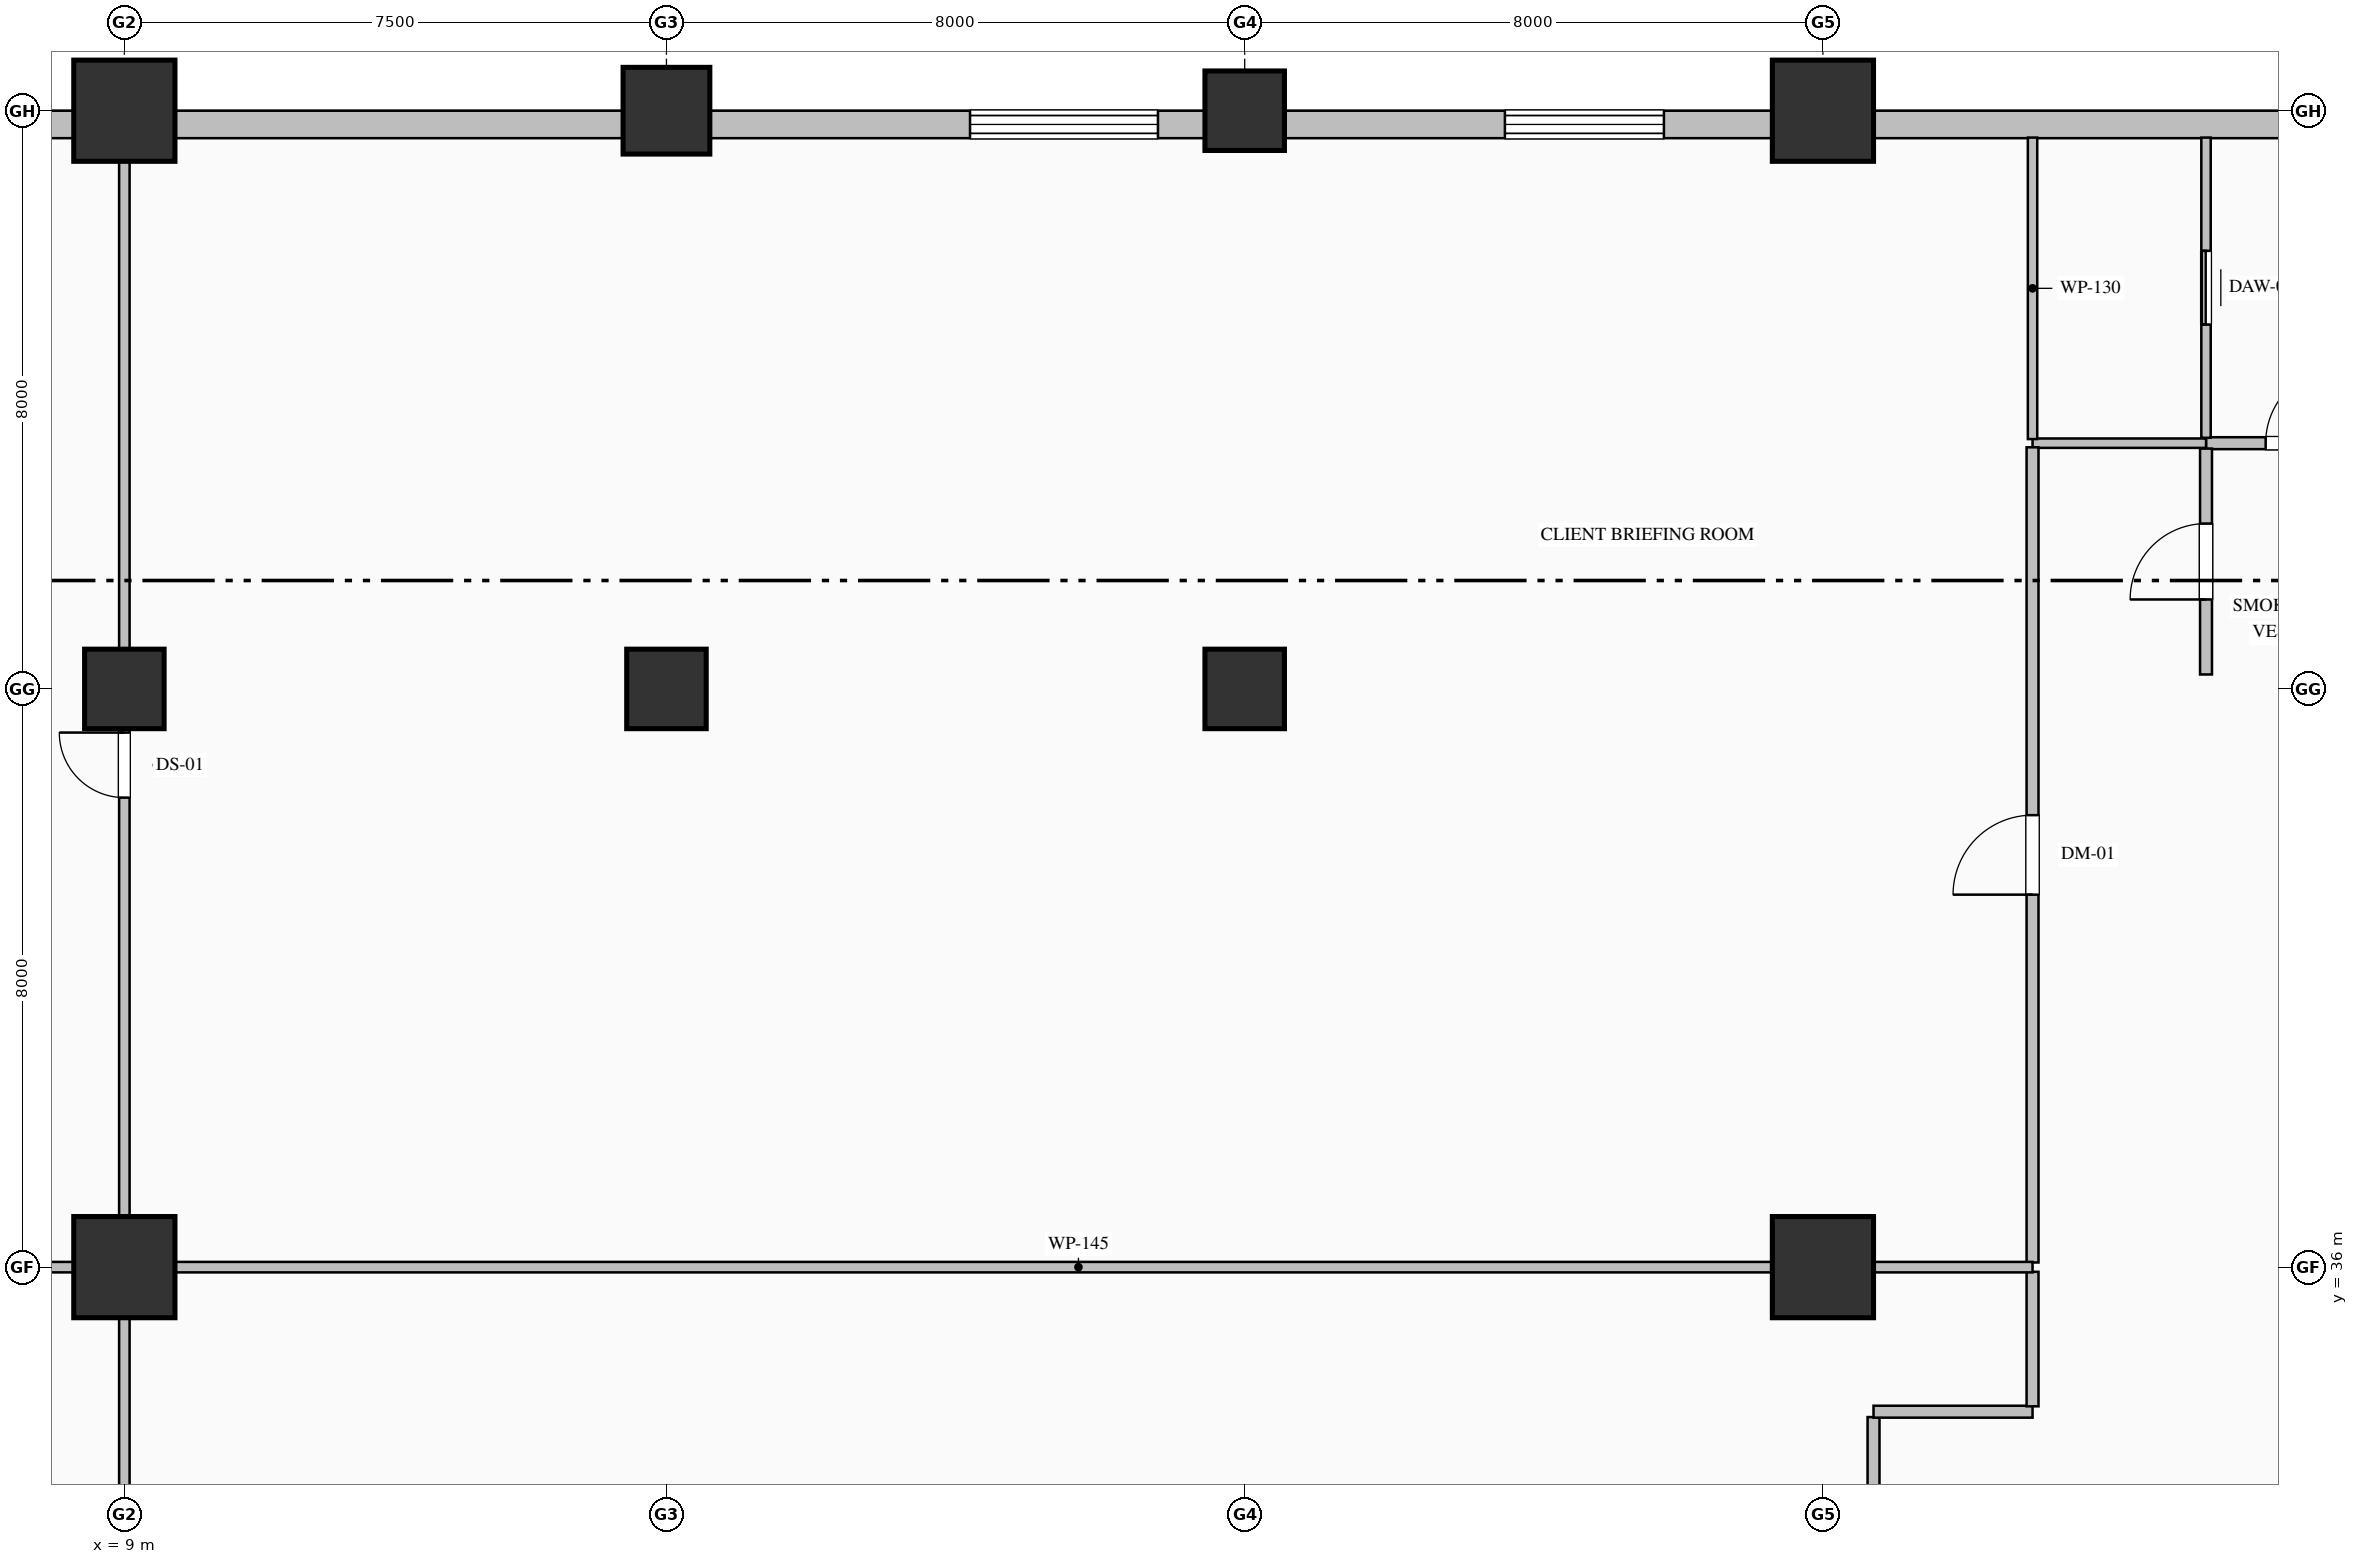
"""IFC4 building model, lengths in metres.
Left out: names, types, materials, properties, quantities, classifications, styles, units other than length and angle.
Written with IfcOpenShell. Run it as: python <this file> out.ifc"""

import sys

from ifc_helpers import new_model, si_unit, direction, frame, frame_2d, origin, origin_2d, place, context, subcontext, project, spatial, rectangle, hollow_rectangle, hollow_circle, extrude, element, fill, save


model = new_model("IFC4")
c1 = context("Model", 3, precision=1e-05, world=origin(), true_north=direction((0.0, 1.0)))
c2 = subcontext(c1, "Body", "Model", "MODEL_VIEW")
j1 = project(units=[si_unit("LENGTHUNIT", "METRE"), si_unit("PLANEANGLEUNIT", "RADIAN")], contexts=[c1])
p1 = place(None, origin())
s1 = spatial("IfcSite", under=j1, at=p1, CompositionType="ELEMENT")
p2 = place(p1, origin())
s2 = spatial("IfcBuilding", under=s1, at=p2, CompositionType="ELEMENT")
p3 = place(p2, frame((0.0, 0.0, 6.0)))
s3 = spatial("IfcBuildingStorey", under=s2, at=p3, CompositionType="ELEMENT", Elevation=6.0)
p4 = place(p3, frame((9.0, 36.0, 0.0), z_axis=(0.0, 0.0, 1.0), x_axis=(1.0, 0.0, 0.0)))
e1 = element("IfcColumn", 1, at=p4, inside=s3, PredefinedType="COLUMN", context=c2, shape_type="SweptSolid", body=[
    extrude(hollow_rectangle(XDim=1.4, YDim=1.4, WallThickness=0.05, at=origin_2d()), origin(), (0.0, 0.0, 1.0), 5.4),
])
p5 = place(p3, frame((9.0, 44.0, 0.0), z_axis=(0.0, 0.0, 1.0), x_axis=(1.0, 0.0, 0.0)))
e2 = element("IfcColumn", 2, at=p5, inside=s3, PredefinedType="COLUMN", context=c2, shape_type="SweptSolid", body=[
    extrude(rectangle(XDim=1.1, YDim=1.1, at=origin_2d()), origin(), (0.0, 0.0, 1.0), 5.4),
])
p6 = place(p3, frame((9.0, 52.0, 0.0), z_axis=(0.0, 0.0, 1.0), x_axis=(1.0, 0.0, 0.0)))
e3 = element("IfcColumn", 3, at=p6, inside=s3, PredefinedType="COLUMN", context=c2, shape_type="SweptSolid", body=[
    extrude(hollow_rectangle(XDim=1.4, YDim=1.4, WallThickness=0.05, at=origin_2d()), origin(), (0.0, 0.0, 1.0), 5.4),
])
p7 = place(p3, frame((16.5, 44.0, 0.0), z_axis=(0.0, 0.0, 1.0), x_axis=(1.0, 0.0, 0.0)))
e4 = element("IfcColumn", 4, at=p7, inside=s3, PredefinedType="COLUMN", context=c2, shape_type="SweptSolid", body=[
    extrude(rectangle(XDim=1.1, YDim=1.1, at=origin_2d()), origin(), (0.0, 0.0, 1.0), 5.4),
])
p8 = place(p3, frame((16.5, 52.0, 0.0), z_axis=(0.0, 0.0, 1.0), x_axis=(1.0, 0.0, 0.0)))
e5 = element("IfcColumn", 5, at=p8, inside=s3, PredefinedType="COLUMN", context=c2, shape_type="SweptSolid", body=[
    extrude(hollow_circle(Radius=0.6, WallThickness=0.04, at=origin_2d()), origin(), (0.0, 0.0, 1.0), 5.4),
])
p9 = place(p3, frame((24.5, 44.0, 0.0), z_axis=(0.0, 0.0, 1.0), x_axis=(1.0, 0.0, 0.0)))
e6 = element("IfcColumn", 6, at=p9, inside=s3, PredefinedType="COLUMN", context=c2, shape_type="SweptSolid", body=[
    extrude(rectangle(XDim=1.1, YDim=1.1, at=origin_2d()), origin(), (0.0, 0.0, 1.0), 5.4),
])
p10 = place(p3, frame((24.5, 52.0, 0.0), z_axis=(0.0, 0.0, 1.0), x_axis=(1.0, 0.0, 0.0)))
e7 = element("IfcColumn", 7, at=p10, inside=s3, PredefinedType="COLUMN", context=c2, shape_type="SweptSolid", body=[
    extrude(hollow_rectangle(XDim=1.1, YDim=1.1, WallThickness=0.04, at=origin_2d()), origin(), (0.0, 0.0, 1.0), 5.4),
])
for number, where, z_axis, x_axis in (
    (8, (32.5, 36.0, 0.0), (0.0, 0.0, 1.0), (1.0, 0.0, 0.0)),
    (9, (32.5, 52.0, 0.0), (0.0, 0.0, 1.0), (1.0, 0.0, 0.0)),
):
    element("IfcColumn", number, at=place(p3, frame(where, z_axis=z_axis, x_axis=x_axis)), inside=s3, PredefinedType="COLUMN", context=c2, shape_type="SweptSolid", body=[
        extrude(hollow_rectangle(XDim=1.4, YDim=1.4, WallThickness=0.05, at=origin_2d()), origin(), (0.0, 0.0, 1.0), 5.4),
    ])
p11 = place(p3, frame((4.0, 51.81, 0.0), z_axis=(0.0, 0.0, 1.0), x_axis=(1.0, 0.0, 0.0)))
e10 = element("IfcWall", 10, at=p11, inside=s3, PredefinedType="SOLIDWALL", context=c2, shape_type="SweptSolid", body=[
    extrude(rectangle(XDim=36.52, YDim=0.38, at=frame_2d((18.26, 0.0))), origin(), (0.0, 0.0, 1.0), 4.62),
])
p12 = place(p11, frame((16.7, 0.0, 0.85)))
e11 = element("IfcOpeningElement", 11, at=p12, cuts=e10, PredefinedType="OPENING", context=c2, shape_type="SweptSolid", body=[
    extrude(rectangle(XDim=2.6, YDim=3.1, at=frame_2d((1.3, 1.55))), frame((0.0, 0.2, 0.0), z_axis=(0.0, -1.0, 0.0), x_axis=(1.0, 0.0, 0.0)), (0.0, 0.0, 1.0), 0.4),
])
p13 = place(p11, frame((24.1, 0.0, 0.9)))
e12 = element("IfcOpeningElement", 12, at=p13, cuts=e10, PredefinedType="OPENING", context=c2, shape_type="SweptSolid", body=[
    extrude(rectangle(XDim=2.2, YDim=2.65, at=frame_2d((1.1, 1.325))), frame((0.0, 0.2, 0.0), z_axis=(0.0, -1.0, 0.0), x_axis=(1.0, 0.0, 0.0)), (0.0, 0.0, 1.0), 0.4),
])
p14 = place(p3, frame((37.8, 47.4, 0.0), z_axis=(0.0, 0.0, 1.0), x_axis=(1.0, 0.0, 0.0)))
e13 = element("IfcWall", 13, at=p14, inside=s3, PredefinedType="PARTITIONING", context=c2, shape_type="SweptSolid", body=[
    extrude(rectangle(XDim=2.7, YDim=0.165, at=frame_2d((1.35, 0.0))), origin(), (0.0, 0.0, 1.0), 5.12),
])
p15 = place(p14, frame((0.825, 0.0, 0.0)))
e14 = element("IfcOpeningElement", 14, at=p15, cuts=e13, PredefinedType="OPENING", context=c2, shape_type="SweptSolid", body=[
    extrude(rectangle(XDim=1.05, YDim=2.15, at=frame_2d((0.525, 1.075))), frame((0.0, 0.093, 0.0), z_axis=(0.0, -1.0, 0.0), x_axis=(1.0, 0.0, 0.0)), (0.0, 0.0, 1.0), 0.185),
])
p16 = place(p3, frame((37.8, 44.2, 0.0), z_axis=(0.0, 0.0, 1.0), x_axis=(0.0, 1.0, 0.0)))
e15 = element("IfcWall", 15, at=p16, inside=s3, PredefinedType="PARTITIONING", context=c2, shape_type="SweptSolid", body=[
    extrude(rectangle(XDim=3.125, YDim=0.165, at=frame_2d((1.563, 0.0))), origin(), (0.0, 0.0, 1.0), 5.12),
])
p17 = place(p16, frame((1.038, 0.0, 0.0)))
e16 = element("IfcOpeningElement", 16, at=p17, cuts=e15, PredefinedType="OPENING", context=c2, shape_type="SweptSolid", body=[
    extrude(rectangle(XDim=1.05, YDim=2.15, at=frame_2d((0.525, 1.075))), frame((0.0, 0.093, 0.0), z_axis=(0.0, -1.0, 0.0), x_axis=(1.0, 0.0, 0.0)), (0.0, 0.0, 1.0), 0.185),
])
p18 = place(p3, frame((37.8, 47.475, 0.0), z_axis=(0.0, 0.0, 1.0), x_axis=(0.0, 1.0, 0.0)))
e17 = element("IfcWall", 17, at=p18, inside=s3, PredefinedType="PARTITIONING", context=c2, shape_type="SweptSolid", body=[
    extrude(rectangle(XDim=4.153, YDim=0.13, at=frame_2d((2.077, 0.0))), origin(), (0.0, 0.0, 1.0), 5.12),
])
p19 = place(p18, frame((1.567, 0.0, 0.0)))
e18 = element("IfcOpeningElement", 18, at=p19, cuts=e17, PredefinedType="OPENING", context=c2, shape_type="SweptSolid", body=[
    extrude(rectangle(XDim=1.02, YDim=2.15, at=frame_2d((0.51, 1.075))), frame((0.0, 0.075, 0.0), z_axis=(0.0, -1.0, 0.0), x_axis=(1.0, 0.0, 0.0)), (0.0, 0.0, 1.0), 0.15),
])
p20 = place(p3, frame((37.8, 47.4, 0.0), z_axis=(0.0, 0.0, 1.0), x_axis=(-1.0, 0.0, 0.0)))
e19 = element("IfcWall", 19, at=p20, inside=s3, PredefinedType="PARTITIONING", context=c2, shape_type="SweptSolid", body=[
    extrude(rectangle(XDim=2.4, YDim=0.13, at=frame_2d((1.2, 0.0))), origin(), (0.0, 0.0, 1.0), 5.12),
])
p21 = place(p3, frame((35.4, 47.457, 0.0), z_axis=(0.0, 0.0, 1.0), x_axis=(0.0, 1.0, 0.0)))
e20 = element("IfcWall", 20, at=p21, inside=s3, PredefinedType="PARTITIONING", context=c2, shape_type="SweptSolid", body=[
    extrude(rectangle(XDim=4.171, YDim=0.13, at=frame_2d((2.085, 0.0))), origin(), (0.0, 0.0, 1.0), 5.12),
])
p22 = place(p3, frame((33.2, 31.875, 0.0), z_axis=(0.0, 0.0, 1.0), x_axis=(0.0, 1.0, 0.0)))
e21 = element("IfcWall", 21, at=p22, inside=s3, PredefinedType="PARTITIONING", context=c2, shape_type="SweptSolid", body=[
    extrude(rectangle(XDim=2.051, YDim=0.165, at=frame_2d((1.025, 0.0))), origin(), (0.0, 0.0, 1.0), 5.12),
])
p23 = place(p3, frame((33.2, 34.0, 0.0), z_axis=(0.0, 0.0, 1.0), x_axis=(1.0, 0.0, 0.0)))
e22 = element("IfcWall", 22, at=p23, inside=s3, PredefinedType="PARTITIONING", context=c2, shape_type="SweptSolid", body=[
    extrude(rectangle(XDim=2.2, YDim=0.165, at=frame_2d((1.1, 0.0))), origin(), (0.0, 0.0, 1.0), 5.12),
])
p24 = place(p3, frame((35.4, 34.074, 0.0), z_axis=(0.0, 0.0, 1.0), x_axis=(0.0, 1.0, 0.0)))
e23 = element("IfcWall", 23, at=p24, inside=s3, PredefinedType="PARTITIONING", context=c2, shape_type="SweptSolid", body=[
    extrude(rectangle(XDim=1.861, YDim=0.165, at=frame_2d((0.931, 0.0))), origin(), (0.0, 0.0, 1.0), 5.12),
])
p25 = place(p3, frame((35.4, 36.064, 0.0), z_axis=(0.0, 0.0, 1.0), x_axis=(0.0, 1.0, 0.0)))
e24 = element("IfcWall", 24, at=p25, inside=s3, PredefinedType="PARTITIONING", context=c2, shape_type="SweptSolid", body=[
    extrude(rectangle(XDim=11.279, YDim=0.165, at=frame_2d((5.639, 0.0))), origin(), (0.0, 0.0, 1.0), 5.12),
])
p26 = place(p25, frame((5.089, 0.0, 0.0)))
e25 = element("IfcOpeningElement", 25, at=p26, cuts=e24, PredefinedType="OPENING", context=c2, shape_type="SweptSolid", body=[
    extrude(rectangle(XDim=1.1, YDim=2.2, at=frame_2d((0.55, 1.1))), frame((0.0, 0.093, 0.0), z_axis=(0.0, -1.0, 0.0), x_axis=(1.0, 0.0, 0.0)), (0.0, 0.0, 1.0), 0.185),
])
p27 = place(p3, frame((9.0, 18.574, 0.0), z_axis=(0.0, 0.0, 1.0), x_axis=(0.0, 1.0, 0.0)))
e26 = element("IfcWall", 26, at=p27, inside=s3, PredefinedType="PARTITIONING", context=c2, shape_type="SweptSolid", body=[
    extrude(rectangle(XDim=17.361, YDim=0.145, at=frame_2d((8.681, 0.0))), origin(), (0.0, 0.0, 1.0), 4.212),
])
p28 = place(p3, frame((9.0, 36.0, 0.0), z_axis=(0.0, 0.0, 1.0), x_axis=(1.0, 0.0, 0.0)))
e27 = element("IfcWall", 27, at=p28, inside=s3, PredefinedType="PARTITIONING", context=c2, shape_type="SweptSolid", body=[
    extrude(rectangle(XDim=26.4, YDim=0.145, at=frame_2d((13.2, 0.0))), origin(), (0.0, 0.0, 1.0), 4.212),
])
p29 = place(p3, frame((0.372, 36.0, 0.0), z_axis=(0.0, 0.0, 1.0), x_axis=(1.0, 0.0, 0.0)))
e28 = element("IfcWall", 28, at=p29, inside=s3, PredefinedType="PARTITIONING", context=c2, shape_type="SweptSolid", body=[
    extrude(rectangle(XDim=8.628, YDim=0.145, at=frame_2d((4.314, 0.0))), origin(), (0.0, 0.0, 1.0), 4.212),
])
p30 = place(p3, frame((9.0, 36.064, 0.0), z_axis=(0.0, 0.0, 1.0), x_axis=(0.0, 1.0, 0.0)))
e29 = element("IfcWall", 29, at=p30, inside=s3, PredefinedType="PARTITIONING", context=c2, shape_type="SweptSolid", body=[
    extrude(rectangle(XDim=15.563, YDim=0.145, at=frame_2d((7.782, 0.0))), origin(), (0.0, 0.0, 1.0), 4.212),
])
p31 = place(p30, frame((6.432, 0.0, 0.0)))
e30 = element("IfcOpeningElement", 30, at=p31, cuts=e29, PredefinedType="OPENING", context=c2, shape_type="SweptSolid", body=[
    extrude(rectangle(XDim=0.9, YDim=2.15, at=frame_2d((0.45, 1.075))), frame((0.0, 0.083, 0.0), z_axis=(0.0, -1.0, 0.0), x_axis=(1.0, 0.0, 0.0)), (0.0, 0.0, 1.0), 0.165),
])
p32 = place(p12, origin())
e31 = element("IfcWindow", 31, at=p32, inside=s3, PartitioningType="TRIPLE_PANEL_VERTICAL", PredefinedType="WINDOW", context=c2, shape_type="SweptSolid", body=[
    extrude(rectangle(XDim=2.6, YDim=3.1, at=frame_2d((1.3, 1.55))), frame((0.0, 0.15, 0.0), z_axis=(0.0, -1.0, 0.0), x_axis=(1.0, 0.0, 0.0)), (0.0, 0.0, 1.0), 0.06),
])
fill(e11, e31)
p33 = place(p13, origin())
e32 = element("IfcWindow", 32, at=p33, inside=s3, PartitioningType="TRIPLE_PANEL_VERTICAL", PredefinedType="WINDOW", context=c2, shape_type="SweptSolid", body=[
    extrude(rectangle(XDim=2.2, YDim=2.65, at=frame_2d((1.1, 1.325))), frame((0.0, 0.15, 0.0), z_axis=(0.0, -1.0, 0.0), x_axis=(1.0, 0.0, 0.0)), (0.0, 0.0, 1.0), 0.06),
])
fill(e12, e32)
p34 = place(p17, origin())
e33 = element("IfcDoor", 33, at=p34, inside=s3, OperationType="SINGLE_SWING_LEFT", PredefinedType="DOOR", context=c2, shape_type="SweptSolid", body=[
    extrude(rectangle(XDim=1.05, YDim=2.15, at=frame_2d((0.525, 1.075))), frame((0.0, 0.025, 0.0), z_axis=(0.0, -1.0, 0.0), x_axis=(1.0, 0.0, 0.0)), (0.0, 0.0, 1.0), 0.05),
])
fill(e16, e33)
p35 = place(p15, origin())
e34 = element("IfcDoor", 34, at=p35, inside=s3, OperationType="SINGLE_SWING_RIGHT", PredefinedType="DOOR", context=c2, shape_type="SweptSolid", body=[
    extrude(rectangle(XDim=1.05, YDim=2.15, at=frame_2d((0.525, 1.075))), frame((0.0, 0.025, 0.0), z_axis=(0.0, -1.0, 0.0), x_axis=(1.0, 0.0, 0.0)), (0.0, 0.0, 1.0), 0.05),
])
fill(e14, e34)
p36 = place(p19, origin())
e35 = element("IfcDoor", 35, at=p36, inside=s3, OperationType="SLIDING_TO_LEFT", PredefinedType="DOOR", context=c2, shape_type="SweptSolid", body=[
    extrude(rectangle(XDim=1.02, YDim=2.15, at=frame_2d((0.51, 1.075))), frame((0.0, 0.025, 0.0), z_axis=(0.0, -1.0, 0.0), x_axis=(1.0, 0.0, 0.0)), (0.0, 0.0, 1.0), 0.05),
])
fill(e18, e35)
p37 = place(p26, origin())
e36 = element("IfcDoor", 36, at=p37, inside=s3, OperationType="SINGLE_SWING_LEFT", PredefinedType="DOOR", context=c2, shape_type="SweptSolid", body=[
    extrude(rectangle(XDim=1.1, YDim=2.2, at=frame_2d((0.55, 1.1))), frame((0.0, 0.025, 0.0), z_axis=(0.0, -1.0, 0.0), x_axis=(1.0, 0.0, 0.0)), (0.0, 0.0, 1.0), 0.05),
])
fill(e25, e36)
p38 = place(p31, origin())
e37 = element("IfcDoor", 37, at=p38, inside=s3, OperationType="SINGLE_SWING_RIGHT", PredefinedType="DOOR", context=c2, shape_type="SweptSolid", body=[
    extrude(rectangle(XDim=0.9, YDim=2.15, at=frame_2d((0.45, 1.075))), frame((0.0, 0.025, 0.0), z_axis=(0.0, -1.0, 0.0), x_axis=(1.0, 0.0, 0.0)), (0.0, 0.0, 1.0), 0.05),
])
fill(e30, e37)
save(model, sys.argv[1])
